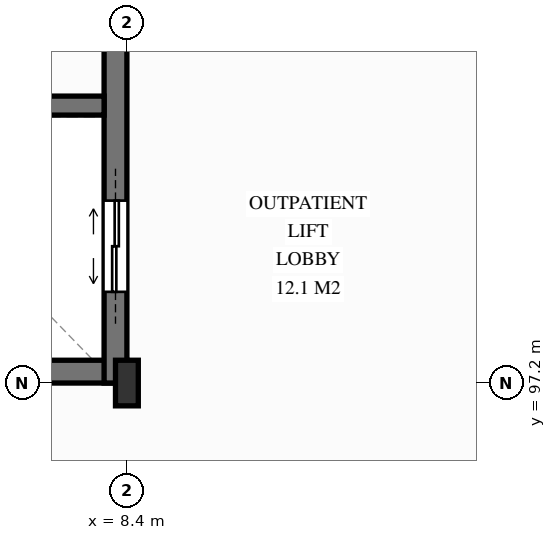
"""IFC4 building model, lengths in metres.
Left out: names, types, materials, properties, quantities, classifications, styles, units other than length and angle.
Written with IfcOpenShell. Run it as: python <this file> out.ifc"""

import sys

from ifc_helpers import new_model, si_unit, direction, frame, frame_2d, origin, origin_2d, place, context, subcontext, project, spatial, rectangle, i_section, extrude, element, fill, save


model = new_model("IFC4")
c1 = context("Model", 3, precision=1e-05, world=origin(), true_north=direction((0.0, 1.0)))
c2 = subcontext(c1, "Body", "Model", "MODEL_VIEW")
j1 = project(units=[si_unit("LENGTHUNIT", "METRE"), si_unit("PLANEANGLEUNIT", "RADIAN")], contexts=[c1])
p1 = place(None, origin())
s1 = spatial("IfcSite", under=j1, at=p1, CompositionType="ELEMENT")
p2 = place(p1, origin())
s2 = spatial("IfcBuilding", under=s1, at=p2, CompositionType="ELEMENT")
p3 = place(p2, origin())
s3 = spatial("IfcBuildingStorey", under=s2, at=p3, CompositionType="ELEMENT", Elevation=0.0)
p4 = place(p3, frame((0.0, 97.35, 0.0), z_axis=(0.0, 0.0, 1.0), x_axis=(1.0, 0.0, 0.0)))
e1 = element("IfcWall", 1, at=p4, inside=s3, PredefinedType="SHEAR", context=c2, shape_type="SweptSolid", body=[
    extrude(rectangle(XDim=8.4, YDim=0.3, at=frame_2d((4.2, 0.0))), origin(), (0.0, 0.0, 1.0), 4.5),
])
p5 = place(p4, frame((3.0, 0.0, 0.0)))
e2 = element("IfcOpeningElement", 2, at=p5, cuts=e1, PredefinedType="OPENING", context=c2, shape_type="SweptSolid", body=[
    extrude(rectangle(XDim=1.1, YDim=2.15, at=frame_2d((0.55, 1.075))), frame((0.0, 0.16, 0.0), z_axis=(0.0, -1.0, 0.0), x_axis=(1.0, 0.0, 0.0)), (0.0, 0.0, 1.0), 0.32),
])
p6 = place(p3, frame((8.25, 97.2, 0.0), z_axis=(0.0, 0.0, 1.0), x_axis=(0.0, 1.0, 0.0)))
e3 = element("IfcWall", 3, at=p6, inside=s3, PredefinedType="SHEAR", context=c2, shape_type="SweptSolid", body=[
    extrude(rectangle(XDim=7.2, YDim=0.3, at=frame_2d((3.6, 0.0))), origin(), (0.0, 0.0, 1.0), 4.5),
])
p7 = place(p6, frame((1.2, 0.0, 0.0)))
e4 = element("IfcOpeningElement", 4, at=p7, cuts=e3, PredefinedType="OPENING", context=c2, shape_type="SweptSolid", body=[
    extrude(rectangle(XDim=1.2, YDim=2.15, at=frame_2d((0.6, 1.075))), frame((0.0, 0.16, 0.0), z_axis=(0.0, -1.0, 0.0), x_axis=(1.0, 0.0, 0.0)), (0.0, 0.0, 1.0), 0.32),
])
p8 = place(p3, frame((0.3, 100.85, 0.0), z_axis=(0.0, 0.0, 1.0), x_axis=(1.0, 0.0, 0.0)))
e5 = element("IfcWall", 5, at=p8, inside=s3, PredefinedType="SHEAR", context=c2, shape_type="SweptSolid", body=[
    extrude(rectangle(XDim=7.8, YDim=0.25, at=frame_2d((3.9, 0.0))), origin(), (0.0, 0.0, 1.0), 4.5),
])
p9 = place(p8, frame((0.4, 0.0, 0.0)))
e6 = element("IfcOpeningElement", 6, at=p9, cuts=e5, PredefinedType="OPENING", context=c2, shape_type="SweptSolid", body=[
    extrude(rectangle(XDim=1.1, YDim=2.15, at=frame_2d((0.55, 1.075))), frame((0.0, 0.135, 0.0), z_axis=(0.0, -1.0, 0.0), x_axis=(1.0, 0.0, 0.0)), (0.0, 0.0, 1.0), 0.27),
])
p10 = place(p3, frame((8.4, 97.2, 0.0), z_axis=(0.0, 0.0, 1.0), x_axis=(1.0, 0.0, 0.0)))
e7 = element("IfcColumn", 7, at=p10, inside=s3, PredefinedType="COLUMN", context=c2, shape_type="SweptSolid", body=[
    extrude(i_section(OverallWidth=0.3, OverallDepth=0.6, WebThickness=0.015, FlangeThickness=0.03, FilletRadius=0.027, at=origin_2d()), origin(), (0.0, 0.0, 1.0), 4.5),
])
p11 = place(p7, origin())
e8 = element("IfcDoor", 8, at=p11, inside=s3, OperationType="DOUBLE_DOOR_SLIDING", PredefinedType="DOOR", context=c2, shape_type="SweptSolid", body=[
    extrude(rectangle(XDim=1.2, YDim=2.15, at=frame_2d((0.6, 1.075))), frame((0.0, 0.025, 0.0), z_axis=(0.0, -1.0, 0.0), x_axis=(1.0, 0.0, 0.0)), (0.0, 0.0, 1.0), 0.05),
])
fill(e4, e8)
save(model, sys.argv[1])
